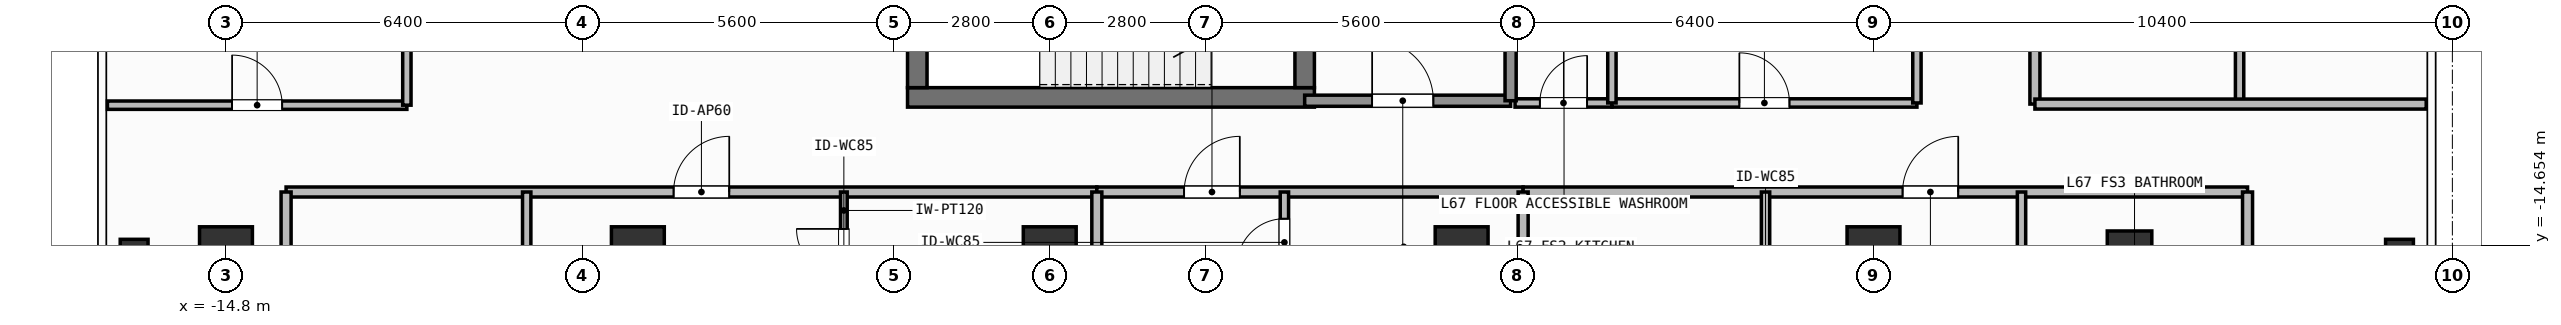
"""IFC4 building model, lengths in metres.
Left out: names, types, materials, properties, quantities, classifications, styles, units other than length and angle.
Written with IfcOpenShell. Run it as: python <this file> out.ifc"""

import sys

from ifc_helpers import new_model, si_unit, direction, frame, frame_2d, origin, origin_2d, place, context, subcontext, project, spatial, rectangle, hollow_rectangle, extrude, element, fill, save


model = new_model("IFC4")
c1 = context("Model", 3, precision=1e-05, world=origin(), true_north=direction((0.0, 1.0)))
c2 = subcontext(c1, "Body", "Model", "MODEL_VIEW")
j1 = project(units=[si_unit("LENGTHUNIT", "METRE"), si_unit("PLANEANGLEUNIT", "RADIAN")], contexts=[c1])
p1 = place(None, origin())
s1 = spatial("IfcSite", under=j1, at=p1, CompositionType="ELEMENT")
p2 = place(p1, origin())
s2 = spatial("IfcBuilding", under=s1, at=p2, CompositionType="ELEMENT")
p3 = place(p2, frame((0.0, 0.0, 274.2)))
s3 = spatial("IfcBuildingStorey", under=s2, at=p3, CompositionType="ELEMENT", Elevation=274.2)
p4 = place(p3, frame((-2.555, -12.0, 0.0), z_axis=(0.0, 0.0, 1.0), x_axis=(1.0, 0.0, 0.0)))
e1 = element("IfcWall", 1, at=p4, inside=s3, PredefinedType="SHEAR", context=c2, shape_type="SweptSolid", body=[
    extrude(rectangle(XDim=7.31, YDim=0.35, at=frame_2d((3.655, 0.0))), origin(), (0.0, 0.0, 1.0), 3.9),
])
p5 = place(p3, frame((-2.38, -11.825, 0.0), z_axis=(0.0, 0.0, 1.0), x_axis=(0.0, 1.0, 0.0)))
e2 = element("IfcWall", 2, at=p5, inside=s3, PredefinedType="SHEAR", context=c2, shape_type="SweptSolid", body=[
    extrude(rectangle(XDim=2.925, YDim=0.35, at=frame_2d((1.462, 0.0))), origin(), (0.0, 0.0, 1.0), 3.9),
])
p6 = place(p3, frame((4.58, -8.9, 0.0), z_axis=(0.0, 0.0, 1.0), x_axis=(0.0, -1.0, 0.0)))
e3 = element("IfcWall", 3, at=p6, inside=s3, PredefinedType="SHEAR", context=c2, shape_type="SweptSolid", body=[
    extrude(rectangle(XDim=2.925, YDim=0.35, at=frame_2d((1.462, 0.0))), origin(), (0.0, 0.0, 1.0), 3.9),
])
p7 = place(p6, frame((0.913, 0.0, 0.0)))
e4 = element("IfcOpeningElement", 4, at=p7, cuts=e3, PredefinedType="OPENING", context=c2, shape_type="SweptSolid", body=[
    extrude(rectangle(XDim=1.1, YDim=2.15, at=frame_2d((0.55, 1.075))), frame((0.0, 0.185, 0.0), z_axis=(0.0, -1.0, 0.0), x_axis=(1.0, 0.0, 0.0)), (0.0, 0.0, 1.0), 0.37),
])
for number, where, z_axis, x_axis in (
    (5, (-14.8, -14.8, 0.0), (0.0, 0.0, 1.0), (1.0, 0.0, 0.0)),
    (6, (-7.4, -14.8, 0.0), (0.0, 0.0, 1.0), (1.0, 0.0, 0.0)),
    (7, (0.0, -14.8, 0.0), (0.0, 0.0, 1.0), (1.0, 0.0, 0.0)),
    (8, (7.4, -14.8, 0.0), (0.0, 0.0, 1.0), (1.0, 0.0, 0.0)),
    (9, (14.8, -14.8, 0.0), (0.0, 0.0, 1.0), (1.0, 0.0, 0.0)),
):
    element("IfcColumn", number, at=place(p3, frame(where, z_axis=z_axis, x_axis=x_axis)), inside=s3, PredefinedType="COLUMN", context=c2, shape_type="SweptSolid", body=[
        extrude(rectangle(XDim=0.95, YDim=0.95, at=origin_2d()), origin(), (0.0, 0.0, 1.0), 3.9),
    ])
p8 = place(p3, frame((19.4, -14.8, 0.0), z_axis=(0.0, 0.0, 1.0), x_axis=(1.0, 0.0, 0.0)))
e10 = element("IfcColumn", 10, at=p8, inside=s3, PredefinedType="COLUMN", context=c2, shape_type="SweptSolid", body=[
    extrude(hollow_rectangle(XDim=0.8, YDim=0.8, WallThickness=0.036, at=origin_2d()), origin(), (0.0, 0.0, 1.0), 3.9),
])
for number, where, z_axis, x_axis in (
    (11, (-16.45, -14.8, 0.0), (0.0, 0.0, 1.0), (1.0, 0.0, 0.0)),
    (12, (24.25, -14.8, 0.0), (0.0, 0.0, 1.0), (1.0, 0.0, 0.0)),
):
    element("IfcColumn", number, at=place(p3, frame(where, z_axis=z_axis, x_axis=x_axis)), inside=s3, PredefinedType="COLUMN", context=c2, shape_type="SweptSolid", body=[
        extrude(hollow_rectangle(XDim=0.5, YDim=0.5, WallThickness=0.025, at=origin_2d()), origin(), (0.0, 0.0, 1.0), 3.9),
    ])
p9 = place(p3, frame((4.58, -12.06, 0.0), z_axis=(0.0, 0.0, 1.0), x_axis=(1.0, 0.0, 0.0)))
e13 = element("IfcWall", 13, at=p9, inside=s3, PredefinedType="SOLIDWALL", context=c2, shape_type="SweptSolid", body=[
    extrude(rectangle(XDim=3.7, YDim=0.2, at=frame_2d((1.85, 0.0))), origin(), (0.0, 0.0, 1.0), 3.68),
])
p10 = place(p9, frame((1.212, 0.0, 0.0)))
e14 = element("IfcOpeningElement", 14, at=p10, cuts=e13, PredefinedType="OPENING", context=c2, shape_type="SweptSolid", body=[
    extrude(rectangle(XDim=1.1, YDim=2.15, at=frame_2d((0.55, 1.075))), frame((0.0, 0.11, 0.0), z_axis=(0.0, -1.0, 0.0), x_axis=(1.0, 0.0, 0.0)), (0.0, 0.0, 1.0), 0.22),
])
p11 = place(p3, frame((8.36, -12.1, 0.0), z_axis=(0.0, 0.0, 1.0), x_axis=(1.0, 0.0, 0.0)))
e15 = element("IfcWall", 15, at=p11, inside=s3, PredefinedType="PARTITIONING", context=c2, shape_type="SweptSolid", body=[
    extrude(rectangle(XDim=1.74, YDim=0.15, at=frame_2d((0.87, 0.0))), origin(), (0.0, 0.0, 1.0), 3.68),
])
p12 = place(p11, frame((0.445, 0.0, 0.0)))
e16 = element("IfcOpeningElement", 16, at=p12, cuts=e15, PredefinedType="OPENING", context=c2, shape_type="SweptSolid", body=[
    extrude(rectangle(XDim=0.85, YDim=2.1, at=frame_2d((0.425, 1.05))), frame((0.0, 0.085, 0.0), z_axis=(0.0, -1.0, 0.0), x_axis=(1.0, 0.0, 0.0)), (0.0, 0.0, 1.0), 0.17),
])
p13 = place(p3, frame((10.1, -12.1, 0.0), z_axis=(0.0, 0.0, 1.0), x_axis=(1.0, 0.0, 0.0)))
e17 = element("IfcWall", 17, at=p13, inside=s3, PredefinedType="PARTITIONING", context=c2, shape_type="SweptSolid", body=[
    extrude(rectangle(XDim=5.48, YDim=0.15, at=frame_2d((2.74, 0.0))), origin(), (0.0, 0.0, 1.0), 3.68),
])
p14 = place(p13, frame((2.29, 0.0, 0.0)))
e18 = element("IfcOpeningElement", 18, at=p14, cuts=e17, PredefinedType="OPENING", context=c2, shape_type="SweptSolid", body=[
    extrude(rectangle(XDim=0.9, YDim=2.1, at=frame_2d((0.45, 1.05))), frame((0.0, 0.085, 0.0), z_axis=(0.0, -1.0, 0.0), x_axis=(1.0, 0.0, 0.0)), (0.0, 0.0, 1.0), 0.17),
])
p15 = place(p3, frame((-13.72, -13.7, 0.0), z_axis=(0.0, 0.0, 1.0), x_axis=(1.0, 0.0, 0.0)))
e19 = element("IfcWall", 19, at=p15, inside=s3, PredefinedType="PARTITIONING", context=c2, shape_type="SweptSolid", body=[
    extrude(rectangle(XDim=14.566, YDim=0.18, at=frame_2d((7.283, 0.0))), origin(), (0.0, 0.0, 1.0), 3.68),
])
p16 = place(p15, frame((6.962, 0.0, 0.0)))
e20 = element("IfcOpeningElement", 20, at=p16, cuts=e19, PredefinedType="OPENING", context=c2, shape_type="SweptSolid", body=[
    extrude(rectangle(XDim=1.0, YDim=2.2, at=frame_2d((0.5, 1.1))), frame((0.0, 0.1, 0.0), z_axis=(0.0, -1.0, 0.0), x_axis=(1.0, 0.0, 0.0)), (0.0, 0.0, 1.0), 0.2),
])
p17 = place(p3, frame((-9.397, -17.586, 0.0), z_axis=(0.0, 0.0, 1.0), x_axis=(0.0, 1.0, 0.0)))
e21 = element("IfcWall", 21, at=p17, inside=s3, PredefinedType="PARTITIONING", context=c2, shape_type="SweptSolid", body=[
    extrude(rectangle(XDim=3.886, YDim=0.15, at=frame_2d((1.943, 0.0))), origin(), (0.0, 0.0, 1.0), 3.68),
])
p18 = place(p17, frame((1.518, 0.0, 0.0)))
e22 = element("IfcOpeningElement", 22, at=p18, cuts=e21, PredefinedType="OPENING", context=c2, shape_type="SweptSolid", body=[
    extrude(rectangle(XDim=0.85, YDim=2.1, at=frame_2d((0.425, 1.05))), frame((0.0, 0.085, 0.0), z_axis=(0.0, -1.0, 0.0), x_axis=(1.0, 0.0, 0.0)), (0.0, 0.0, 1.0), 0.17),
])
p19 = place(p3, frame((-3.699, -15.876, 0.0), z_axis=(0.0, 0.0, 1.0), x_axis=(0.0, 1.0, 0.0)))
e23 = element("IfcWall", 23, at=p19, inside=s3, PredefinedType="PARTITIONING", context=c2, shape_type="SweptSolid", body=[
    extrude(rectangle(XDim=2.176, YDim=0.12, at=frame_2d((1.088, 0.0))), origin(), (0.0, 0.0, 1.0), 3.68),
])
p20 = place(p19, frame((0.663, 0.0, 0.0)))
e24 = element("IfcOpeningElement", 24, at=p20, cuts=e23, PredefinedType="OPENING", context=c2, shape_type="SweptSolid", body=[
    extrude(rectangle(XDim=0.85, YDim=2.1, at=frame_2d((0.425, 1.05))), frame((0.0, 0.07, 0.0), z_axis=(0.0, -1.0, 0.0), x_axis=(1.0, 0.0, 0.0)), (0.0, 0.0, 1.0), 0.14),
])
p21 = place(p3, frame((0.846, -13.7, 0.0), z_axis=(0.0, 0.0, 1.0), x_axis=(1.0, 0.0, 0.0)))
e25 = element("IfcWall", 25, at=p21, inside=s3, PredefinedType="PARTITIONING", context=c2, shape_type="SweptSolid", body=[
    extrude(rectangle(XDim=7.659, YDim=0.18, at=frame_2d((3.83, 0.0))), origin(), (0.0, 0.0, 1.0), 3.68),
])
p22 = place(p21, frame((1.569, 0.0, 0.0)))
e26 = element("IfcOpeningElement", 26, at=p22, cuts=e25, PredefinedType="OPENING", context=c2, shape_type="SweptSolid", body=[
    extrude(rectangle(XDim=1.0, YDim=2.2, at=frame_2d((0.5, 1.1))), frame((0.0, 0.1, 0.0), z_axis=(0.0, -1.0, 0.0), x_axis=(1.0, 0.0, 0.0)), (0.0, 0.0, 1.0), 0.2),
])
p23 = place(p3, frame((4.216, -15.67, 0.0), z_axis=(0.0, 0.0, 1.0), x_axis=(0.0, 1.0, 0.0)))
e27 = element("IfcWall", 27, at=p23, inside=s3, PredefinedType="PARTITIONING", context=c2, shape_type="SweptSolid", body=[
    extrude(rectangle(XDim=1.97, YDim=0.15, at=frame_2d((0.985, 0.0))), origin(), (0.0, 0.0, 1.0), 3.68),
])
p24 = place(p23, frame((0.64, 0.0, 0.0)))
e28 = element("IfcOpeningElement", 28, at=p24, cuts=e27, PredefinedType="OPENING", context=c2, shape_type="SweptSolid", body=[
    extrude(rectangle(XDim=0.85, YDim=2.1, at=frame_2d((0.425, 1.05))), frame((0.0, 0.085, 0.0), z_axis=(0.0, -1.0, 0.0), x_axis=(1.0, 0.0, 0.0)), (0.0, 0.0, 1.0), 0.17),
])
p25 = place(p3, frame((8.505, -13.7, 0.0), z_axis=(0.0, 0.0, 1.0), x_axis=(1.0, 0.0, 0.0)))
e29 = element("IfcWall", 29, at=p25, inside=s3, PredefinedType="PARTITIONING", context=c2, shape_type="SweptSolid", body=[
    extrude(rectangle(XDim=13.015, YDim=0.18, at=frame_2d((6.508, 0.0))), origin(), (0.0, 0.0, 1.0), 3.68),
])
p26 = place(p25, frame((6.817, 0.0, 0.0)))
e30 = element("IfcOpeningElement", 30, at=p26, cuts=e29, PredefinedType="OPENING", context=c2, shape_type="SweptSolid", body=[
    extrude(rectangle(XDim=1.0, YDim=2.2, at=frame_2d((0.5, 1.1))), frame((0.0, 0.1, 0.0), z_axis=(0.0, -1.0, 0.0), x_axis=(1.0, 0.0, 0.0)), (0.0, 0.0, 1.0), 0.2),
])
p27 = place(p3, frame((12.86, -16.983, 0.0), z_axis=(0.0, 0.0, 1.0), x_axis=(0.0, 1.0, 0.0)))
e31 = element("IfcWall", 31, at=p27, inside=s3, PredefinedType="PARTITIONING", context=c2, shape_type="SweptSolid", body=[
    extrude(rectangle(XDim=3.283, YDim=0.15, at=frame_2d((1.642, 0.0))), origin(), (0.0, 0.0, 1.0), 3.68),
])
p28 = place(p27, frame((1.217, 0.0, 0.0)))
e32 = element("IfcOpeningElement", 32, at=p28, cuts=e31, PredefinedType="OPENING", context=c2, shape_type="SweptSolid", body=[
    extrude(rectangle(XDim=0.85, YDim=2.1, at=frame_2d((0.425, 1.05))), frame((0.0, 0.085, 0.0), z_axis=(0.0, -1.0, 0.0), x_axis=(1.0, 0.0, 0.0)), (0.0, 0.0, 1.0), 0.17),
])
p29 = place(p3, frame((17.459, -16.983, 0.0), z_axis=(0.0, 0.0, 1.0), x_axis=(0.0, 1.0, 0.0)))
e33 = element("IfcWall", 33, at=p29, inside=s3, PredefinedType="PARTITIONING", context=c2, shape_type="SweptSolid", body=[
    extrude(rectangle(XDim=3.283, YDim=0.15, at=frame_2d((1.642, 0.0))), origin(), (0.0, 0.0, 1.0), 3.68),
])
p30 = place(p29, frame((0.688, 0.0, 0.0)))
e34 = element("IfcOpeningElement", 34, at=p30, cuts=e33, PredefinedType="OPENING", context=c2, shape_type="SweptSolid", body=[
    extrude(rectangle(XDim=0.85, YDim=2.1, at=frame_2d((0.425, 1.05))), frame((0.0, 0.085, 0.0), z_axis=(0.0, -1.0, 0.0), x_axis=(1.0, 0.0, 0.0)), (0.0, 0.0, 1.0), 0.17),
])
p31 = place(p3, frame((-16.93, -12.14, 0.0), z_axis=(0.0, 0.0, 1.0), x_axis=(1.0, 0.0, 0.0)))
e35 = element("IfcWall", 35, at=p31, inside=s3, PredefinedType="PARTITIONING", context=c2, shape_type="SweptSolid", body=[
    extrude(rectangle(XDim=5.38, YDim=0.15, at=frame_2d((2.69, 0.0))), origin(), (0.0, 0.0, 1.0), 3.68),
])
p32 = place(p31, frame((2.24, 0.0, 0.0)))
e36 = element("IfcOpeningElement", 36, at=p32, cuts=e35, PredefinedType="OPENING", context=c2, shape_type="SweptSolid", body=[
    extrude(rectangle(XDim=0.9, YDim=2.1, at=frame_2d((0.45, 1.05))), frame((0.0, 0.085, 0.0), z_axis=(0.0, -1.0, 0.0), x_axis=(1.0, 0.0, 0.0)), (0.0, 0.0, 1.0), 0.17),
])
p33 = place(p3, frame((17.7, -12.12, 0.0), z_axis=(0.0, 0.0, 1.0), x_axis=(0.0, 1.0, 0.0)))
e37 = element("IfcWall", 37, at=p33, inside=s3, PredefinedType="PARTITIONING", context=c2, shape_type="SweptSolid", body=[
    extrude(rectangle(XDim=24.24, YDim=0.18, at=frame_2d((12.12, 0.0))), origin(), (0.0, 0.0, 1.0), 3.68),
])
p34 = place(p33, frame((11.62, 0.0, 0.0)))
e38 = element("IfcOpeningElement", 38, at=p34, cuts=e37, PredefinedType="OPENING", context=c2, shape_type="SweptSolid", body=[
    extrude(rectangle(XDim=1.0, YDim=2.2, at=frame_2d((0.5, 1.1))), frame((0.0, 0.1, 0.0), z_axis=(0.0, -1.0, 0.0), x_axis=(1.0, 0.0, 0.0)), (0.0, 0.0, 1.0), 0.2),
])
p35 = place(p3, frame((8.28, -12.06, 0.0), z_axis=(0.0, 0.0, 1.0), x_axis=(0.0, 1.0, 0.0)))
e39 = element("IfcWall", 39, at=p35, inside=s3, PredefinedType="SOLIDWALL", context=c2, shape_type="SweptSolid", body=[
    extrude(rectangle(XDim=3.335, YDim=0.2, at=frame_2d((1.667, 0.0))), origin(), (0.0, 0.0, 1.0), 3.68),
])
p36 = place(p3, frame((10.1, -12.1, 0.0), z_axis=(0.0, 0.0, 1.0), x_axis=(0.0, 1.0, 0.0)))
e40 = element("IfcWall", 40, at=p36, inside=s3, PredefinedType="PARTITIONING", context=c2, shape_type="SweptSolid", body=[
    extrude(rectangle(XDim=2.35, YDim=0.15, at=frame_2d((1.175, 0.0))), origin(), (0.0, 0.0, 1.0), 3.68),
])
p37 = place(p3, frame((15.58, -12.1, 0.0), z_axis=(0.0, 0.0, 1.0), x_axis=(0.0, 1.0, 0.0)))
e41 = element("IfcWall", 41, at=p37, inside=s3, PredefinedType="PARTITIONING", context=c2, shape_type="SweptSolid", body=[
    extrude(rectangle(XDim=6.25, YDim=0.15, at=frame_2d((3.125, 0.0))), origin(), (0.0, 0.0, 1.0), 3.68),
])
for number, where, z_axis, x_axis in (
    (42, (-13.72, -19.51, 0.0), (0.0, 0.0, 1.0), (0.0, 1.0, 0.0)),
    (43, (21.52, -19.51, 0.0), (0.0, 0.0, 1.0), (0.0, 1.0, 0.0)),
):
    element("IfcWall", number, at=place(p3, frame(where, z_axis=z_axis, x_axis=x_axis)), inside=s3, PredefinedType="PARTITIONING", context=c2, shape_type="SweptSolid", body=[
        extrude(rectangle(XDim=5.81, YDim=0.18, at=frame_2d((2.905, 0.0))), origin(), (0.0, 0.0, 1.0), 3.68),
    ])
for number, where, z_axis, x_axis in (
    (44, (0.846, -20.63, 0.0), (0.0, 0.0, 1.0), (0.0, 1.0, 0.0)),
    (45, (8.505, -20.63, 0.0), (0.0, 0.0, 1.0), (0.0, 1.0, 0.0)),
):
    element("IfcWall", number, at=place(p3, frame(where, z_axis=z_axis, x_axis=x_axis)), inside=s3, PredefinedType="PARTITIONING", context=c2, shape_type="SweptSolid", body=[
        extrude(rectangle(XDim=6.93, YDim=0.18, at=frame_2d((3.465, 0.0))), origin(), (0.0, 0.0, 1.0), 3.68),
    ])
p38 = place(p3, frame((-11.55, -12.14, 0.0), z_axis=(0.0, 0.0, 1.0), x_axis=(0.0, 1.0, 0.0)))
e46 = element("IfcWall", 46, at=p38, inside=s3, PredefinedType="PARTITIONING", context=c2, shape_type="SweptSolid", body=[
    extrude(rectangle(XDim=16.24, YDim=0.15, at=frame_2d((8.12, 0.0))), origin(), (0.0, 0.0, 1.0), 3.68),
])
p39 = place(p3, frame((21.377, -12.12, 0.0), z_axis=(0.0, 0.0, 1.0), x_axis=(0.0, 1.0, 0.0)))
e47 = element("IfcWall", 47, at=p39, inside=s3, PredefinedType="PARTITIONING", context=c2, shape_type="SweptSolid", body=[
    extrude(rectangle(XDim=6.692, YDim=0.15, at=frame_2d((3.346, 0.0))), origin(), (0.0, 0.0, 1.0), 3.68),
])
p40 = place(p3, frame((17.7, -12.12, 0.0), z_axis=(0.0, 0.0, 1.0), x_axis=(1.0, 0.0, 0.0)))
e48 = element("IfcWall", 48, at=p40, inside=s3, PredefinedType="PARTITIONING", context=c2, shape_type="SweptSolid", body=[
    extrude(rectangle(XDim=7.03, YDim=0.18, at=frame_2d((3.515, 0.0))), origin(), (0.0, 0.0, 1.0), 3.68),
])
p41 = place(p10, origin())
e49 = element("IfcDoor", 49, at=p41, inside=s3, OperationType="SINGLE_SWING_LEFT", PredefinedType="DOOR", context=c2, shape_type="SweptSolid", body=[
    extrude(rectangle(XDim=1.1, YDim=2.15, at=frame_2d((0.55, 1.075))), frame((0.0, 0.025, 0.0), z_axis=(0.0, -1.0, 0.0), x_axis=(1.0, 0.0, 0.0)), (0.0, 0.0, 1.0), 0.05),
])
fill(e14, e49)
p42 = place(p12, origin())
e50 = element("IfcDoor", 50, at=p42, inside=s3, OperationType="SINGLE_SWING_RIGHT", PredefinedType="DOOR", context=c2, shape_type="SweptSolid", body=[
    extrude(rectangle(XDim=0.85, YDim=2.1, at=frame_2d((0.425, 1.05))), frame((0.0, 0.025, 0.0), z_axis=(0.0, -1.0, 0.0), x_axis=(1.0, 0.0, 0.0)), (0.0, 0.0, 1.0), 0.05),
])
fill(e16, e50)
p43 = place(p14, origin())
e51 = element("IfcDoor", 51, at=p43, inside=s3, OperationType="SINGLE_SWING_LEFT", PredefinedType="DOOR", context=c2, shape_type="SweptSolid", body=[
    extrude(rectangle(XDim=0.9, YDim=2.1, at=frame_2d((0.45, 1.05))), frame((0.0, 0.025, 0.0), z_axis=(0.0, -1.0, 0.0), x_axis=(1.0, 0.0, 0.0)), (0.0, 0.0, 1.0), 0.05),
])
fill(e18, e51)
p44 = place(p16, origin())
e52 = element("IfcDoor", 52, at=p44, inside=s3, OperationType="SINGLE_SWING_RIGHT", PredefinedType="DOOR", context=c2, shape_type="SweptSolid", body=[
    extrude(rectangle(XDim=1.0, YDim=2.2, at=frame_2d((0.5, 1.1))), frame((0.0, 0.025, 0.0), z_axis=(0.0, -1.0, 0.0), x_axis=(1.0, 0.0, 0.0)), (0.0, 0.0, 1.0), 0.05),
])
fill(e20, e52)
p45 = place(p20, origin())
e53 = element("IfcDoor", 53, at=p45, inside=s3, OperationType="SINGLE_SWING_RIGHT", PredefinedType="DOOR", context=c2, shape_type="SweptSolid", body=[
    extrude(rectangle(XDim=0.85, YDim=2.1, at=frame_2d((0.425, 1.05))), frame((0.0, 0.025, 0.0), z_axis=(0.0, -1.0, 0.0), x_axis=(1.0, 0.0, 0.0)), (0.0, 0.0, 1.0), 0.05),
])
fill(e24, e53)
p46 = place(p22, origin())
e54 = element("IfcDoor", 54, at=p46, inside=s3, OperationType="SINGLE_SWING_RIGHT", PredefinedType="DOOR", context=c2, shape_type="SweptSolid", body=[
    extrude(rectangle(XDim=1.0, YDim=2.2, at=frame_2d((0.5, 1.1))), frame((0.0, 0.025, 0.0), z_axis=(0.0, -1.0, 0.0), x_axis=(1.0, 0.0, 0.0)), (0.0, 0.0, 1.0), 0.05),
])
fill(e26, e54)
p47 = place(p24, origin())
e55 = element("IfcDoor", 55, at=p47, inside=s3, OperationType="SINGLE_SWING_LEFT", PredefinedType="DOOR", context=c2, shape_type="SweptSolid", body=[
    extrude(rectangle(XDim=0.85, YDim=2.1, at=frame_2d((0.425, 1.05))), frame((0.0, 0.025, 0.0), z_axis=(0.0, -1.0, 0.0), x_axis=(1.0, 0.0, 0.0)), (0.0, 0.0, 1.0), 0.05),
])
fill(e28, e55)
p48 = place(p26, origin())
e56 = element("IfcDoor", 56, at=p48, inside=s3, OperationType="SINGLE_SWING_RIGHT", PredefinedType="DOOR", context=c2, shape_type="SweptSolid", body=[
    extrude(rectangle(XDim=1.0, YDim=2.2, at=frame_2d((0.5, 1.1))), frame((0.0, 0.025, 0.0), z_axis=(0.0, -1.0, 0.0), x_axis=(1.0, 0.0, 0.0)), (0.0, 0.0, 1.0), 0.05),
])
fill(e30, e56)
p49 = place(p32, origin())
e57 = element("IfcDoor", 57, at=p49, inside=s3, OperationType="SINGLE_SWING_LEFT", PredefinedType="DOOR", context=c2, shape_type="SweptSolid", body=[
    extrude(rectangle(XDim=0.9, YDim=2.1, at=frame_2d((0.45, 1.05))), frame((0.0, 0.025, 0.0), z_axis=(0.0, -1.0, 0.0), x_axis=(1.0, 0.0, 0.0)), (0.0, 0.0, 1.0), 0.05),
])
fill(e36, e57)
save(model, sys.argv[1])
